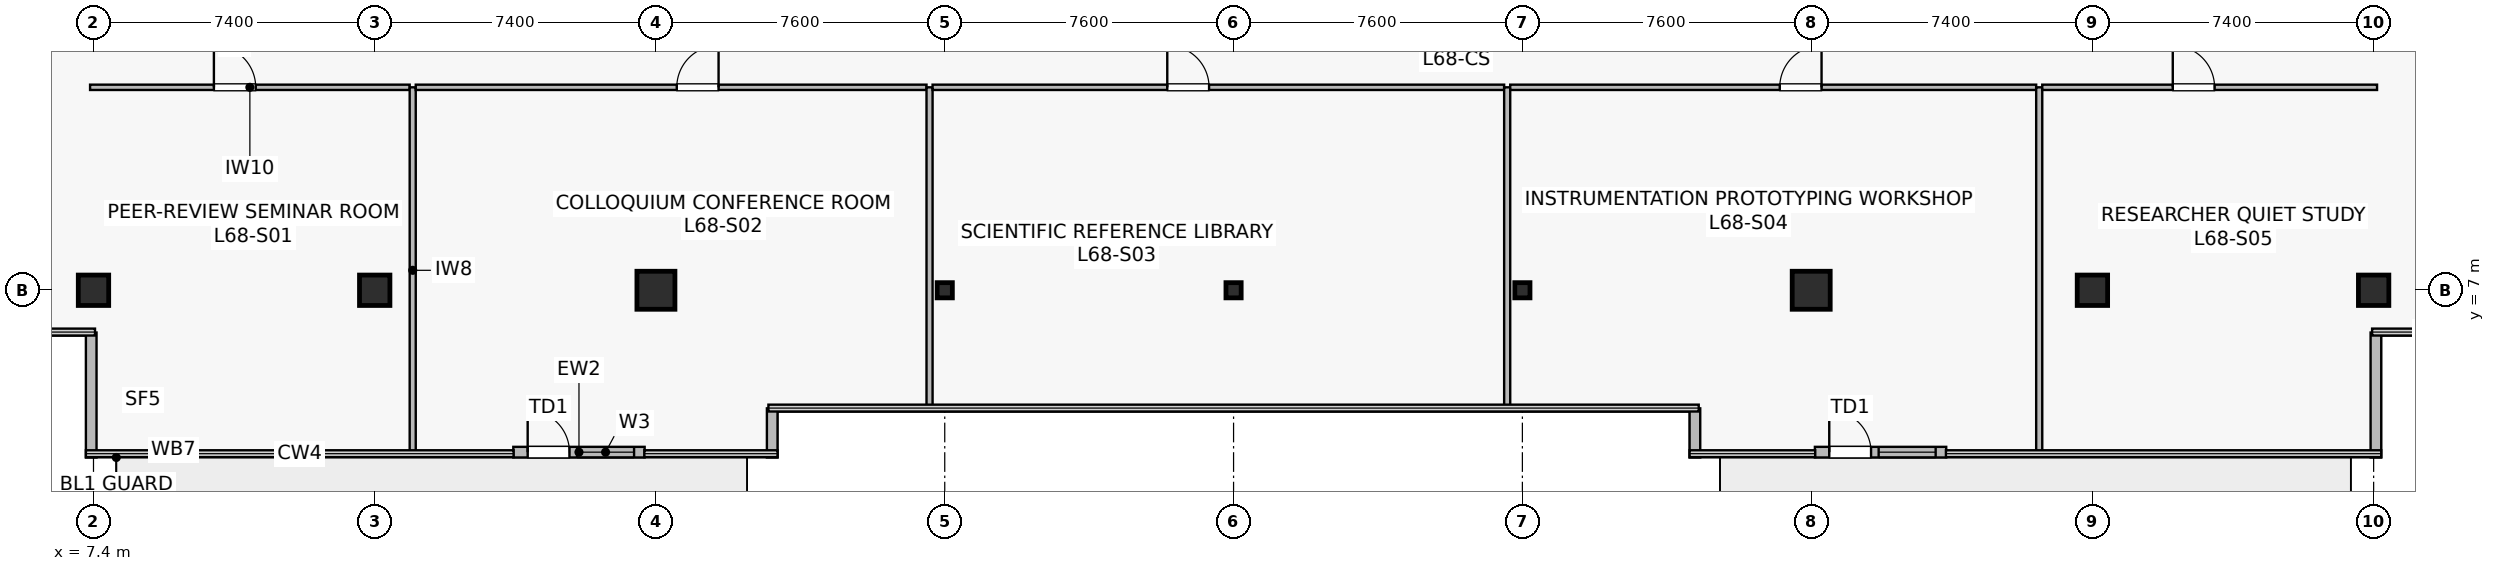
"""IFC4 building model, lengths in metres.
Left out: names, types, materials, properties, quantities, classifications, styles, units other than length and angle.
Written with IfcOpenShell. Run it as: python <this file> out.ifc"""

import sys

from ifc_helpers import new_model, si_unit, direction, frame, frame_2d, origin, origin_2d, place, context, subcontext, project, spatial, rectangle, hollow_rectangle, extrude, source, transform, mapped, element, fill, save


model = new_model("IFC4")
c1 = context("Model", 3, precision=1e-05, world=origin(), true_north=direction((0.0, 1.0)))
c2 = subcontext(c1, "Body", "Model", "MODEL_VIEW")
j1 = project(units=[si_unit("LENGTHUNIT", "METRE"), si_unit("PLANEANGLEUNIT", "RADIAN")], contexts=[c1])
p1 = place(None, origin())
s1 = spatial("IfcSite", under=j1, at=p1, CompositionType="ELEMENT")
p2 = place(p1, origin())
s2 = spatial("IfcBuilding", under=s1, at=p2, CompositionType="ELEMENT")
p3 = place(p2, frame((0.0, 0.0, 283.4)))
s3 = spatial("IfcBuildingStorey", under=s2, at=p3, CompositionType="ELEMENT", Elevation=283.4)
m1 = source(origin(), c2, "Body", "SweptSolid", [
    extrude(rectangle(XDim=0.8, YDim=0.8, at=origin_2d()), origin(), (0.0, 0.0, 1.0), 4.1),
])
p4 = place(p3, frame((14.8, 7.0, 0.0), z_axis=(0.0, 0.0, 1.0), x_axis=(1.0, 0.0, 0.0)))
e1 = element("IfcColumn", 1, at=p4, inside=s3, PredefinedType="COLUMN", context=c2, shape_type="MappedRepresentation", body=[
    mapped(m1, transform((0.0, 0.0, 0.0), scale=1.0)),
])
m2 = source(origin(), c2, "Body", "SweptSolid", [
    extrude(rectangle(XDim=1.0, YDim=1.0, at=origin_2d()), origin(), (0.0, 0.0, 1.0), 4.1),
])
for number, where, z_axis, x_axis in (
    (2, (22.2, 7.0, 0.0), (0.0, 0.0, 1.0), (1.0, 0.0, 0.0)),
    (3, (52.6, 7.0, 0.0), (0.0, 0.0, 1.0), (1.0, 0.0, 0.0)),
):
    element("IfcColumn", number, at=place(p3, frame(where, z_axis=z_axis, x_axis=x_axis)), inside=s3, PredefinedType="COLUMN", context=c2, shape_type="MappedRepresentation", body=[
        mapped(m2, transform((0.0, 0.0, 0.0), scale=1.0)),
    ])
for number, where, z_axis, x_axis in (
    (4, (60.0, 7.0, 0.0), (0.0, 0.0, 1.0), (1.0, 0.0, 0.0)),
    (5, (7.4, 7.0, 0.0), (0.0, 0.0, 1.0), (1.0, 0.0, 0.0)),
    (6, (67.4, 7.0, 0.0), (0.0, 0.0, 1.0), (1.0, 0.0, 0.0)),
):
    element("IfcColumn", number, at=place(p3, frame(where, z_axis=z_axis, x_axis=x_axis)), inside=s3, PredefinedType="COLUMN", context=c2, shape_type="MappedRepresentation", body=[
        mapped(m1, transform((0.0, 0.0, 0.0), scale=1.0)),
    ])
m3 = source(origin(), c2, "Body", "SweptSolid", [
    extrude(hollow_rectangle(XDim=0.4, YDim=0.4, WallThickness=0.019, at=origin_2d()), origin(), (0.0, 0.0, 1.0), 4.1),
])
for number, where, z_axis, x_axis in (
    (7, (29.8, 7.0, 0.0), (0.0, 0.0, 1.0), (1.0, 0.0, 0.0)),
    (8, (37.4, 7.0, 0.0), (0.0, 0.0, 1.0), (1.0, 0.0, 0.0)),
    (9, (45.0, 7.0, 0.0), (0.0, 0.0, 1.0), (1.0, 0.0, 0.0)),
):
    element("IfcColumn", number, at=place(p3, frame(where, z_axis=z_axis, x_axis=x_axis)), inside=s3, PredefinedType="COLUMN", context=c2, shape_type="MappedRepresentation", body=[
        mapped(m3, transform((0.0, 0.0, 0.0), scale=1.0)),
    ])
p5 = place(p3, frame((18.447, 2.74, 0.0), z_axis=(0.0, 0.0, 1.0), x_axis=(1.0, 0.0, 0.0)))
e10 = element("IfcWall", 10, at=p5, inside=s3, PredefinedType="STANDARD", context=c2, shape_type="SweptSolid", body=[
    extrude(rectangle(XDim=3.456, YDim=0.28, at=frame_2d((1.728, 0.0))), origin(), (0.0, 0.0, 1.0), 3.8),
])
p6 = place(p5, frame((0.378, 0.0, 0.0)))
e11 = element("IfcOpeningElement", 11, at=p6, cuts=e10, PredefinedType="OPENING", context=c2, shape_type="SweptSolid", body=[
    extrude(rectangle(XDim=1.1, YDim=2.2, at=frame_2d((0.55, 1.1))), frame((0.0, 0.15, 0.0), z_axis=(0.0, -1.0, 0.0), x_axis=(1.0, 0.0, 0.0)), (0.0, 0.0, 1.0), 0.3),
])
p7 = place(p5, frame((1.678, 0.0, 0.9)))
e12 = element("IfcOpeningElement", 12, at=p7, cuts=e10, PredefinedType="OPENING", context=c2, shape_type="SweptSolid", body=[
    extrude(rectangle(XDim=1.5, YDim=2.2, at=frame_2d((0.75, 1.1))), frame((0.0, 0.15, 0.0), z_axis=(0.0, -1.0, 0.0), x_axis=(1.0, 0.0, 0.0)), (0.0, 0.0, 1.0), 0.3),
])
p8 = place(p3, frame((52.697, 2.74, 0.0), z_axis=(0.0, 0.0, 1.0), x_axis=(1.0, 0.0, 0.0)))
e13 = element("IfcWall", 13, at=p8, inside=s3, PredefinedType="STANDARD", context=c2, shape_type="SweptSolid", body=[
    extrude(rectangle(XDim=3.456, YDim=0.28, at=frame_2d((1.728, 0.0))), origin(), (0.0, 0.0, 1.0), 3.8),
])
p9 = place(p8, frame((0.378, 0.0, 0.0)))
e14 = element("IfcOpeningElement", 14, at=p9, cuts=e13, PredefinedType="OPENING", context=c2, shape_type="SweptSolid", body=[
    extrude(rectangle(XDim=1.1, YDim=2.2, at=frame_2d((0.55, 1.1))), frame((0.0, 0.15, 0.0), z_axis=(0.0, -1.0, 0.0), x_axis=(1.0, 0.0, 0.0)), (0.0, 0.0, 1.0), 0.3),
])
p10 = place(p8, frame((1.678, 0.0, 0.9)))
e15 = element("IfcOpeningElement", 15, at=p10, cuts=e13, PredefinedType="OPENING", context=c2, shape_type="SweptSolid", body=[
    extrude(rectangle(XDim=1.5, YDim=2.2, at=frame_2d((0.75, 1.1))), frame((0.0, 0.15, 0.0), z_axis=(0.0, -1.0, 0.0), x_axis=(1.0, 0.0, 0.0)), (0.0, 0.0, 1.0), 0.3),
])
for number, where, z_axis, x_axis in (
    (16, (25.26, 2.6, 0.0), (0.0, 0.0, 1.0), (0.0, 1.0, 0.0)),
    (17, (49.54, 3.893, 0.0), (0.0, 0.0, 1.0), (0.0, -1.0, 0.0)),
):
    element("IfcWall", number, at=place(p3, frame(where, z_axis=z_axis, x_axis=x_axis)), inside=s3, PredefinedType="STANDARD", context=c2, shape_type="SweptSolid", body=[
        extrude(rectangle(XDim=1.293, YDim=0.28, at=frame_2d((0.646, 0.0))), origin(), (0.0, 0.0, 1.0), 3.8),
    ])
for number, where, z_axis, x_axis in (
    (18, (67.46, 2.6, 0.0), (0.0, 0.0, 1.0), (0.0, 1.0, 0.0)),
    (19, (7.34, 5.888, 0.0), (0.0, 0.0, 1.0), (0.0, -1.0, 0.0)),
):
    element("IfcWall", number, at=place(p3, frame(where, z_axis=z_axis, x_axis=x_axis)), inside=s3, PredefinedType="STANDARD", context=c2, shape_type="SweptSolid", body=[
        extrude(rectangle(XDim=3.288, YDim=0.28, at=frame_2d((1.644, 0.0))), origin(), (0.0, 0.0, 1.0), 3.8),
    ])
p11 = place(p3, frame((7.31, 12.34, 0.0), z_axis=(0.0, 0.0, 1.0), x_axis=(1.0, 0.0, 0.0)))
e20 = element("IfcWall", 20, at=p11, inside=s3, PredefinedType="PARTITIONING", context=c2, shape_type="SweptSolid", body=[
    extrude(rectangle(XDim=8.41, YDim=0.14, at=frame_2d((4.205, 0.0))), origin(), (0.0, 0.0, 1.0), 3.197),
])
p12 = place(p11, frame((3.258, 0.0, 0.0)))
e21 = element("IfcOpeningElement", 21, at=p12, cuts=e20, PredefinedType="OPENING", context=c2, shape_type="SweptSolid", body=[
    extrude(rectangle(XDim=1.1, YDim=2.18, at=frame_2d((0.55, 1.09))), frame((0.0, 0.08, 0.0), z_axis=(0.0, -1.0, 0.0), x_axis=(1.0, 0.0, 0.0)), (0.0, 0.0, 1.0), 0.16),
])
p13 = place(p3, frame((15.8, 2.71, 0.0), z_axis=(0.0, 0.0, 1.0), x_axis=(0.0, 1.0, 0.0)))
e22 = element("IfcWall", 22, at=p13, inside=s3, PredefinedType="PARTITIONING", context=c2, shape_type="SweptSolid", body=[
    extrude(rectangle(XDim=9.63, YDim=0.16, at=frame_2d((4.815, 0.0))), origin(), (0.0, 0.0, 1.0), 3.135),
])
p14 = place(p3, frame((15.88, 12.34, 0.0), z_axis=(0.0, 0.0, 1.0), x_axis=(1.0, 0.0, 0.0)))
e23 = element("IfcWall", 23, at=p14, inside=s3, PredefinedType="PARTITIONING", context=c2, shape_type="SweptSolid", body=[
    extrude(rectangle(XDim=13.44, YDim=0.14, at=frame_2d((6.72, 0.0))), origin(), (0.0, 0.0, 1.0), 3.197),
])
p15 = place(p14, frame((6.868, 0.0, 0.0)))
e24 = element("IfcOpeningElement", 24, at=p15, cuts=e23, PredefinedType="OPENING", context=c2, shape_type="SweptSolid", body=[
    extrude(rectangle(XDim=1.1, YDim=2.18, at=frame_2d((0.55, 1.09))), frame((0.0, 0.08, 0.0), z_axis=(0.0, -1.0, 0.0), x_axis=(1.0, 0.0, 0.0)), (0.0, 0.0, 1.0), 0.16),
])
p16 = place(p3, frame((29.4, 3.91, 0.0), z_axis=(0.0, 0.0, 1.0), x_axis=(0.0, 1.0, 0.0)))
e25 = element("IfcWall", 25, at=p16, inside=s3, PredefinedType="PARTITIONING", context=c2, shape_type="SweptSolid", body=[
    extrude(rectangle(XDim=8.43, YDim=0.16, at=frame_2d((4.215, 0.0))), origin(), (0.0, 0.0, 1.0), 3.135),
])
p17 = place(p3, frame((29.48, 12.34, 0.0), z_axis=(0.0, 0.0, 1.0), x_axis=(1.0, 0.0, 0.0)))
e26 = element("IfcWall", 26, at=p17, inside=s3, PredefinedType="PARTITIONING", context=c2, shape_type="SweptSolid", body=[
    extrude(rectangle(XDim=15.04, YDim=0.14, at=frame_2d((7.52, 0.0))), origin(), (0.0, 0.0, 1.0), 3.197),
])
p18 = place(p17, frame((6.176, 0.0, 0.0)))
e27 = element("IfcOpeningElement", 27, at=p18, cuts=e26, PredefinedType="OPENING", context=c2, shape_type="SweptSolid", body=[
    extrude(rectangle(XDim=1.1, YDim=2.18, at=frame_2d((0.55, 1.09))), frame((0.0, 0.08, 0.0), z_axis=(0.0, -1.0, 0.0), x_axis=(1.0, 0.0, 0.0)), (0.0, 0.0, 1.0), 0.16),
])
p19 = place(p3, frame((44.6, 3.91, 0.0), z_axis=(0.0, 0.0, 1.0), x_axis=(0.0, 1.0, 0.0)))
e28 = element("IfcWall", 28, at=p19, inside=s3, PredefinedType="PARTITIONING", context=c2, shape_type="SweptSolid", body=[
    extrude(rectangle(XDim=8.43, YDim=0.16, at=frame_2d((4.215, 0.0))), origin(), (0.0, 0.0, 1.0), 3.135),
])
p20 = place(p3, frame((44.68, 12.34, 0.0), z_axis=(0.0, 0.0, 1.0), x_axis=(1.0, 0.0, 0.0)))
e29 = element("IfcWall", 29, at=p20, inside=s3, PredefinedType="PARTITIONING", context=c2, shape_type="SweptSolid", body=[
    extrude(rectangle(XDim=13.84, YDim=0.14, at=frame_2d((6.92, 0.0))), origin(), (0.0, 0.0, 1.0), 3.197),
])
p21 = place(p20, frame((7.092, 0.0, 0.0)))
e30 = element("IfcOpeningElement", 30, at=p21, cuts=e29, PredefinedType="OPENING", context=c2, shape_type="SweptSolid", body=[
    extrude(rectangle(XDim=1.1, YDim=2.18, at=frame_2d((0.55, 1.09))), frame((0.0, 0.08, 0.0), z_axis=(0.0, -1.0, 0.0), x_axis=(1.0, 0.0, 0.0)), (0.0, 0.0, 1.0), 0.16),
])
p22 = place(p3, frame((58.6, 2.71, 0.0), z_axis=(0.0, 0.0, 1.0), x_axis=(0.0, 1.0, 0.0)))
e31 = element("IfcWall", 31, at=p22, inside=s3, PredefinedType="PARTITIONING", context=c2, shape_type="SweptSolid", body=[
    extrude(rectangle(XDim=9.63, YDim=0.16, at=frame_2d((4.815, 0.0))), origin(), (0.0, 0.0, 1.0), 3.135),
])
p23 = place(p3, frame((58.68, 12.34, 0.0), z_axis=(0.0, 0.0, 1.0), x_axis=(1.0, 0.0, 0.0)))
e32 = element("IfcWall", 32, at=p23, inside=s3, PredefinedType="PARTITIONING", context=c2, shape_type="SweptSolid", body=[
    extrude(rectangle(XDim=8.81, YDim=0.14, at=frame_2d((4.405, 0.0))), origin(), (0.0, 0.0, 1.0), 3.197),
])
p24 = place(p23, frame((3.434, 0.0, 0.0)))
e33 = element("IfcOpeningElement", 33, at=p24, cuts=e32, PredefinedType="OPENING", context=c2, shape_type="SweptSolid", body=[
    extrude(rectangle(XDim=1.1, YDim=2.18, at=frame_2d((0.55, 1.09))), frame((0.0, 0.08, 0.0), z_axis=(0.0, -1.0, 0.0), x_axis=(1.0, 0.0, 0.0)), (0.0, 0.0, 1.0), 0.16),
])
m4 = source(origin(), c2, "Body", "SweptSolid", [
    extrude(rectangle(XDim=1.1, YDim=2.2, at=frame_2d((0.55, 1.1))), frame((0.0, 0.025, 0.0), z_axis=(0.0, -1.0, 0.0), x_axis=(1.0, 0.0, 0.0)), (0.0, 0.0, 1.0), 0.05),
])
p25 = place(p6, origin())
e34 = element("IfcDoor", 34, at=p25, inside=s3, OperationType="SINGLE_SWING_LEFT", PredefinedType="DOOR", context=c2, shape_type="MappedRepresentation", body=[
    mapped(m4, transform((0.0, 0.0, 0.0), scale=1.0)),
])
fill(e11, e34)
m5 = source(origin(), c2, "Body", "SweptSolid", [
    extrude(rectangle(XDim=1.5, YDim=2.2, at=frame_2d((0.75, 1.1))), frame((0.0, 0.03, 0.0), z_axis=(0.0, -1.0, 0.0), x_axis=(1.0, 0.0, 0.0)), (0.0, 0.0, 1.0), 0.06),
])
p26 = place(p7, origin())
e35 = element("IfcWindow", 35, at=p26, inside=s3, PartitioningType="SINGLE_PANEL", PredefinedType="WINDOW", context=c2, shape_type="MappedRepresentation", body=[
    mapped(m5, transform((0.0, 0.0, 0.0), scale=1.0)),
])
fill(e12, e35)
p27 = place(p9, origin())
e36 = element("IfcDoor", 36, at=p27, inside=s3, OperationType="SINGLE_SWING_LEFT", PredefinedType="DOOR", context=c2, shape_type="MappedRepresentation", body=[
    mapped(m4, transform((0.0, 0.0, 0.0), scale=1.0)),
])
fill(e14, e36)
p28 = place(p10, origin())
e37 = element("IfcWindow", 37, at=p28, inside=s3, PartitioningType="SINGLE_PANEL", PredefinedType="WINDOW", context=c2, shape_type="MappedRepresentation", body=[
    mapped(m5, transform((0.0, 0.0, 0.0), scale=1.0)),
])
fill(e15, e37)
m6 = source(origin(), c2, "Body", "SweptSolid", [
    extrude(rectangle(XDim=1.1, YDim=2.18, at=frame_2d((0.55, 1.09))), frame((0.0, 0.025, 0.0), z_axis=(0.0, -1.0, 0.0), x_axis=(1.0, 0.0, 0.0)), (0.0, 0.0, 1.0), 0.05),
])
p29 = place(p12, origin())
e38 = element("IfcDoor", 38, at=p29, inside=s3, OperationType="SINGLE_SWING_LEFT", PredefinedType="DOOR", context=c2, shape_type="MappedRepresentation", body=[
    mapped(m6, transform((0.0, 0.0, 0.0), scale=1.0)),
])
fill(e21, e38)
p30 = place(p15, origin())
e39 = element("IfcDoor", 39, at=p30, inside=s3, OperationType="SINGLE_SWING_RIGHT", PredefinedType="DOOR", context=c2, shape_type="MappedRepresentation", body=[
    mapped(m6, transform((0.0, 0.0, 0.0), scale=1.0)),
])
fill(e24, e39)
p31 = place(p18, origin())
e40 = element("IfcDoor", 40, at=p31, inside=s3, OperationType="SINGLE_SWING_LEFT", PredefinedType="DOOR", context=c2, shape_type="MappedRepresentation", body=[
    mapped(m6, transform((0.0, 0.0, 0.0), scale=1.0)),
])
fill(e27, e40)
p32 = place(p21, origin())
e41 = element("IfcDoor", 41, at=p32, inside=s3, OperationType="SINGLE_SWING_RIGHT", PredefinedType="DOOR", context=c2, shape_type="MappedRepresentation", body=[
    mapped(m6, transform((0.0, 0.0, 0.0), scale=1.0)),
])
fill(e30, e41)
p33 = place(p24, origin())
e42 = element("IfcDoor", 42, at=p33, inside=s3, OperationType="SINGLE_SWING_LEFT", PredefinedType="DOOR", context=c2, shape_type="MappedRepresentation", body=[
    mapped(m6, transform((0.0, 0.0, 0.0), scale=1.0)),
])
fill(e33, e42)
save(model, sys.argv[1])
